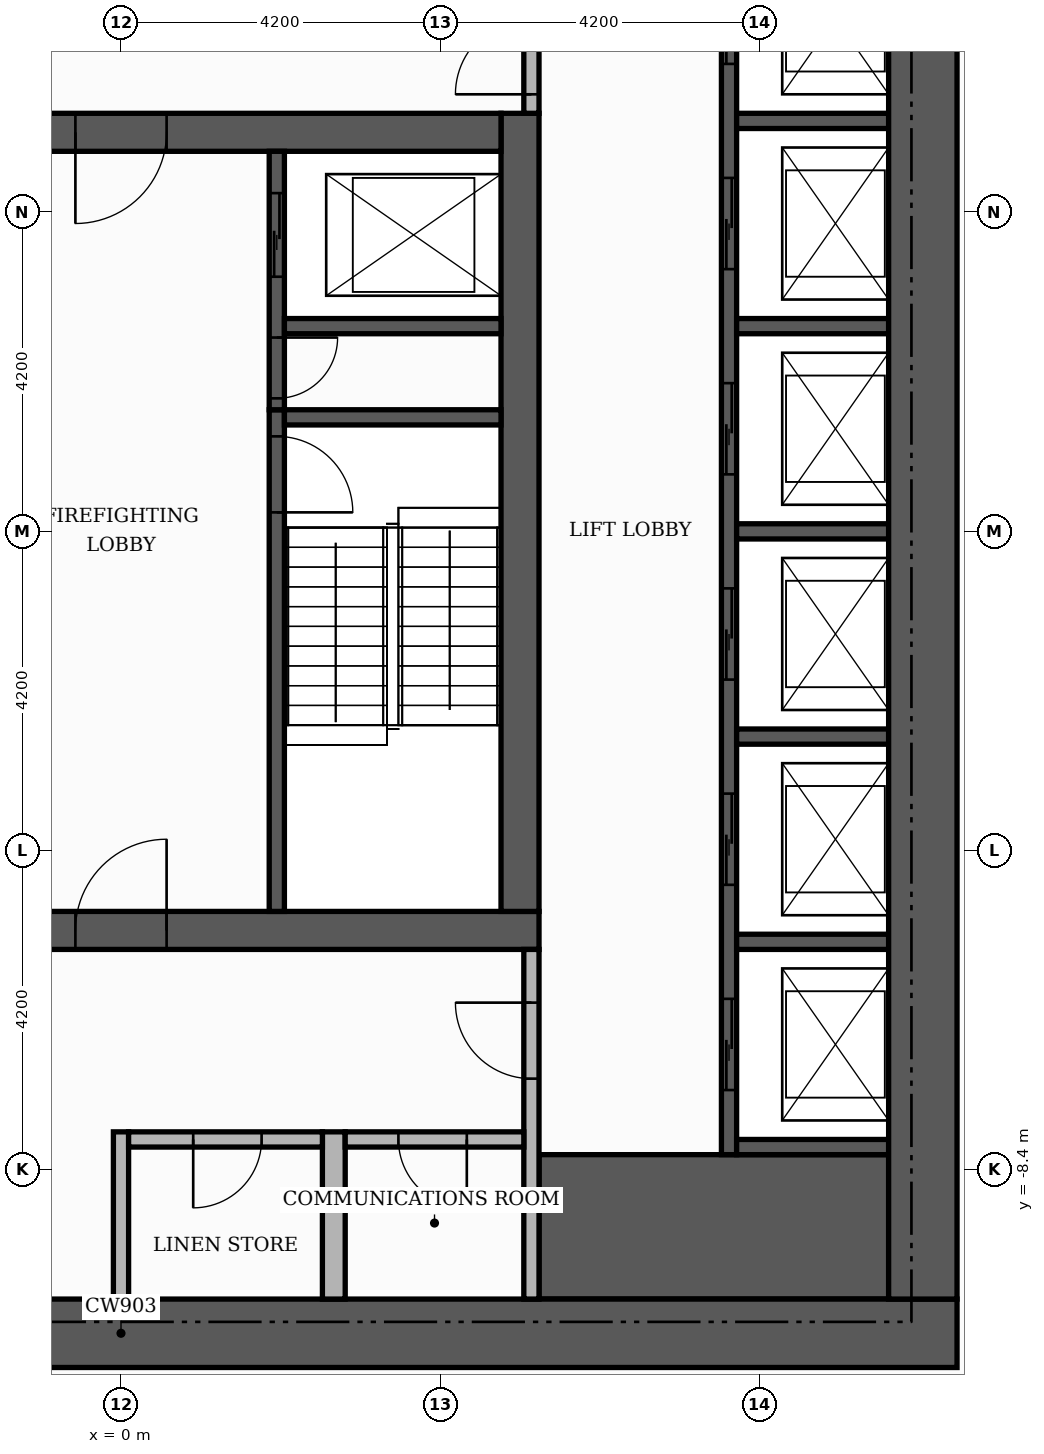
"""IFC4 building model, lengths in metres.
Left out: names, types, materials, properties, quantities, classifications, styles, units other than length and angle.
Written with IfcOpenShell. Run it as: python <this file> out.ifc"""

import sys

from ifc_helpers import new_model, si_unit, direction, frame, frame_2d, origin, place, context, subcontext, project, spatial, rectangle, extrude, element, fill, save


model = new_model("IFC4")
c1 = context("Model", 3, precision=1e-05, world=origin(), true_north=direction((0.0, 1.0)))
c2 = subcontext(c1, "Body", "Model", "MODEL_VIEW")
j1 = project(units=[si_unit("LENGTHUNIT", "METRE"), si_unit("PLANEANGLEUNIT", "RADIAN")], contexts=[c1])
p1 = place(None, origin())
s1 = spatial("IfcSite", under=j1, at=p1, CompositionType="ELEMENT")
p2 = place(p1, origin())
s2 = spatial("IfcBuilding", under=s1, at=p2, CompositionType="ELEMENT")
p3 = place(p2, frame((0.0, 0.0, 180.6)))
s3 = spatial("IfcBuildingStorey", under=s2, at=p3, CompositionType="ELEMENT", Elevation=180.6)
p4 = place(p3, frame((-5.5, -5.25, 0.0), z_axis=(0.0, 0.0, 1.0), x_axis=(1.0, 0.0, 0.0)))
e1 = element("IfcWall", 1, at=p4, inside=s3, PredefinedType="SHEAR", context=c2, shape_type="SweptSolid", body=[
    extrude(rectangle(XDim=11.0, YDim=0.5, at=frame_2d((5.5, 0.0))), origin(), (0.0, 0.0, 1.0), 7.38),
])
p5 = place(p4, frame((4.9, 0.0, 0.0)))
e2 = element("IfcOpeningElement", 2, at=p5, cuts=e1, PredefinedType="OPENING", context=c2, shape_type="SweptSolid", body=[
    extrude(rectangle(XDim=1.2, YDim=2.1, at=frame_2d((0.6, 1.05))), frame((0.0, 0.26, 0.0), z_axis=(0.0, -1.0, 0.0), x_axis=(1.0, 0.0, 0.0)), (0.0, 0.0, 1.0), 0.52),
])
p6 = place(p3, frame((5.25, -5.0, 0.0), z_axis=(0.0, 0.0, 1.0), x_axis=(0.0, 1.0, 0.0)))
e3 = element("IfcWall", 3, at=p6, inside=s3, PredefinedType="SHEAR", context=c2, shape_type="SweptSolid", body=[
    extrude(rectangle(XDim=10.5, YDim=0.5, at=frame_2d((5.25, 0.0))), origin(), (0.0, 0.0, 1.0), 7.38),
])
p7 = place(p3, frame((-5.0, 5.25, 0.0), z_axis=(0.0, 0.0, 1.0), x_axis=(1.0, 0.0, 0.0)))
e4 = element("IfcWall", 4, at=p7, inside=s3, PredefinedType="SHEAR", context=c2, shape_type="SweptSolid", body=[
    extrude(rectangle(XDim=10.0, YDim=0.5, at=frame_2d((5.0, 0.0))), origin(), (0.0, 0.0, 1.0), 7.38),
])
p8 = place(p7, frame((4.4, 0.0, 0.0)))
e5 = element("IfcOpeningElement", 5, at=p8, cuts=e4, PredefinedType="OPENING", context=c2, shape_type="SweptSolid", body=[
    extrude(rectangle(XDim=1.2, YDim=2.1, at=frame_2d((0.6, 1.05))), frame((0.0, 0.26, 0.0), z_axis=(0.0, -1.0, 0.0), x_axis=(1.0, 0.0, 0.0)), (0.0, 0.0, 1.0), 0.52),
])
p9 = place(p3, frame((5.5, -9.15, 0.0), z_axis=(0.0, 0.0, 1.0), x_axis=(1.0, 0.0, 0.0)))
e6 = element("IfcWall", 6, at=p9, inside=s3, PredefinedType="SHEAR", context=c2, shape_type="SweptSolid", body=[
    extrude(rectangle(XDim=4.6, YDim=1.9, at=frame_2d((2.3, 0.0))), origin(), (0.0, 0.0, 1.0), 7.38),
])
p10 = place(p3, frame((2.05, -5.0, 0.0), z_axis=(0.0, 0.0, 1.0), x_axis=(0.0, 1.0, 0.0)))
e7 = element("IfcWall", 7, at=p10, inside=s3, PredefinedType="SHEAR", context=c2, shape_type="SweptSolid", body=[
    extrude(rectangle(XDim=6.6, YDim=0.2, at=frame_2d((3.3, 0.0))), origin(), (0.0, 0.0, 1.0), 7.38),
])
p11 = place(p10, frame((5.25, 0.0, 0.0)))
e8 = element("IfcOpeningElement", 8, at=p11, cuts=e7, PredefinedType="OPENING", context=c2, shape_type="SweptSolid", body=[
    extrude(rectangle(XDim=1.0, YDim=2.1, at=frame_2d((0.5, 1.05))), frame((0.0, 0.11, 0.0), z_axis=(0.0, -1.0, 0.0), x_axis=(1.0, 0.0, 0.0)), (0.0, 0.0, 1.0), 0.22),
])
p12 = place(p3, frame((2.15, 1.5, 0.0), z_axis=(0.0, 0.0, 1.0), x_axis=(1.0, 0.0, 0.0)))
e9 = element("IfcWall", 9, at=p12, inside=s3, PredefinedType="SHEAR", context=c2, shape_type="SweptSolid", body=[
    extrude(rectangle(XDim=2.85, YDim=0.2, at=frame_2d((1.425, 0.0))), origin(), (0.0, 0.0, 1.0), 7.38),
])
p13 = place(p3, frame((8.0, -8.2, 0.0), z_axis=(0.0, 0.0, 1.0), x_axis=(0.0, 1.0, 0.0)))
e10 = element("IfcWall", 10, at=p13, inside=s3, PredefinedType="SHEAR", context=c2, shape_type="SweptSolid", body=[
    extrude(rectangle(XDim=16.4, YDim=0.2, at=frame_2d((8.2, 0.0))), origin(), (0.0, 0.0, 1.0), 7.38),
])
p14 = place(p13, frame((0.85, 0.0, 0.0)))
e11 = element("IfcOpeningElement", 11, at=p14, cuts=e10, PredefinedType="OPENING", context=c2, shape_type="SweptSolid", body=[
    extrude(rectangle(XDim=1.2, YDim=2.1, at=frame_2d((0.6, 1.05))), frame((0.0, 0.11, 0.0), z_axis=(0.0, -1.0, 0.0), x_axis=(1.0, 0.0, 0.0)), (0.0, 0.0, 1.0), 0.22),
])
p15 = place(p13, frame((3.55, 0.0, 0.0)))
e12 = element("IfcOpeningElement", 12, at=p15, cuts=e10, PredefinedType="OPENING", context=c2, shape_type="SweptSolid", body=[
    extrude(rectangle(XDim=1.2, YDim=2.1, at=frame_2d((0.6, 1.05))), frame((0.0, 0.11, 0.0), z_axis=(0.0, -1.0, 0.0), x_axis=(1.0, 0.0, 0.0)), (0.0, 0.0, 1.0), 0.22),
])
p16 = place(p13, frame((6.25, 0.0, 0.0)))
e13 = element("IfcOpeningElement", 13, at=p16, cuts=e10, PredefinedType="OPENING", context=c2, shape_type="SweptSolid", body=[
    extrude(rectangle(XDim=1.2, YDim=2.1, at=frame_2d((0.6, 1.05))), frame((0.0, 0.11, 0.0), z_axis=(0.0, -1.0, 0.0), x_axis=(1.0, 0.0, 0.0)), (0.0, 0.0, 1.0), 0.22),
])
p17 = place(p13, frame((8.95, 0.0, 0.0)))
e14 = element("IfcOpeningElement", 14, at=p17, cuts=e10, PredefinedType="OPENING", context=c2, shape_type="SweptSolid", body=[
    extrude(rectangle(XDim=1.2, YDim=2.1, at=frame_2d((0.6, 1.05))), frame((0.0, 0.11, 0.0), z_axis=(0.0, -1.0, 0.0), x_axis=(1.0, 0.0, 0.0)), (0.0, 0.0, 1.0), 0.22),
])
p18 = place(p13, frame((11.65, 0.0, 0.0)))
e15 = element("IfcOpeningElement", 15, at=p18, cuts=e10, PredefinedType="OPENING", context=c2, shape_type="SweptSolid", body=[
    extrude(rectangle(XDim=1.2, YDim=2.1, at=frame_2d((0.6, 1.05))), frame((0.0, 0.11, 0.0), z_axis=(0.0, -1.0, 0.0), x_axis=(1.0, 0.0, 0.0)), (0.0, 0.0, 1.0), 0.22),
])
p19 = place(p13, frame((14.35, 0.0, 0.0)))
e16 = element("IfcOpeningElement", 16, at=p19, cuts=e10, PredefinedType="OPENING", context=c2, shape_type="SweptSolid", body=[
    extrude(rectangle(XDim=1.2, YDim=2.1, at=frame_2d((0.6, 1.05))), frame((0.0, 0.11, 0.0), z_axis=(0.0, -1.0, 0.0), x_axis=(1.0, 0.0, 0.0)), (0.0, 0.0, 1.0), 0.22),
])
for number, where, z_axis, x_axis in (
    (17, (8.1, -8.1, 0.0), (0.0, 0.0, 1.0), (1.0, 0.0, 0.0)),
    (18, (8.1, -5.4, 0.0), (0.0, 0.0, 1.0), (1.0, 0.0, 0.0)),
    (19, (8.1, -2.7, 0.0), (0.0, 0.0, 1.0), (1.0, 0.0, 0.0)),
    (20, (8.1, 0.0, 0.0), (0.0, 0.0, 1.0), (1.0, 0.0, 0.0)),
):
    element("IfcWall", number, at=place(p3, frame(where, z_axis=z_axis, x_axis=x_axis)), inside=s3, PredefinedType="SHEAR", context=c2, shape_type="SweptSolid", body=[
        extrude(rectangle(XDim=2.0, YDim=0.2, at=frame_2d((1.0, 0.0))), origin(), (0.0, 0.0, 1.0), 7.38),
    ])
p20 = place(p3, frame((2.05, 1.6, 0.0), z_axis=(0.0, 0.0, 1.0), x_axis=(0.0, 1.0, 0.0)))
e21 = element("IfcWall", 21, at=p20, inside=s3, PredefinedType="SHEAR", context=c2, shape_type="SweptSolid", body=[
    extrude(rectangle(XDim=3.4, YDim=0.2, at=frame_2d((1.7, 0.0))), origin(), (0.0, 0.0, 1.0), 7.38),
])
p21 = place(p20, frame((1.75, 0.0, 0.0)))
e22 = element("IfcOpeningElement", 22, at=p21, cuts=e21, PredefinedType="OPENING", context=c2, shape_type="SweptSolid", body=[
    extrude(rectangle(XDim=1.1, YDim=2.1, at=frame_2d((0.55, 1.05))), frame((0.0, 0.11, 0.0), z_axis=(0.0, -1.0, 0.0), x_axis=(1.0, 0.0, 0.0)), (0.0, 0.0, 1.0), 0.22),
])
p22 = place(p20, frame((0.15, 0.0, 0.0)))
e23 = element("IfcOpeningElement", 23, at=p22, cuts=e21, PredefinedType="OPENING", context=c2, shape_type="SweptSolid", body=[
    extrude(rectangle(XDim=0.8, YDim=2.1, at=frame_2d((0.4, 1.05))), frame((0.0, 0.11, 0.0), z_axis=(0.0, -1.0, 0.0), x_axis=(1.0, 0.0, 0.0)), (0.0, 0.0, 1.0), 0.22),
])
p23 = place(p3, frame((2.15, 2.7, 0.0), z_axis=(0.0, 0.0, 1.0), x_axis=(1.0, 0.0, 0.0)))
e24 = element("IfcWall", 24, at=p23, inside=s3, PredefinedType="SHEAR", context=c2, shape_type="SweptSolid", body=[
    extrude(rectangle(XDim=2.85, YDim=0.2, at=frame_2d((1.425, 0.0))), origin(), (0.0, 0.0, 1.0), 7.38),
])
for number, where, z_axis, x_axis in (
    (25, (8.1, 2.7, 0.0), (0.0, 0.0, 1.0), (1.0, 0.0, 0.0)),
    (26, (8.1, 5.4, 0.0), (0.0, 0.0, 1.0), (1.0, 0.0, 0.0)),
):
    element("IfcWall", number, at=place(p3, frame(where, z_axis=z_axis, x_axis=x_axis)), inside=s3, PredefinedType="SHEAR", context=c2, shape_type="SweptSolid", body=[
        extrude(rectangle(XDim=2.0, YDim=0.2, at=frame_2d((1.0, 0.0))), origin(), (0.0, 0.0, 1.0), 7.38),
    ])
p24 = place(p3, frame((-11.0, -10.55, 0.0), z_axis=(0.0, 0.0, 1.0), x_axis=(1.0, 0.0, 0.0)))
e27 = element("IfcWall", 27, at=p24, inside=s3, PredefinedType="SHEAR", context=c2, shape_type="SweptSolid", body=[
    extrude(rectangle(XDim=22.0, YDim=0.9, at=frame_2d((11.0, 0.0))), origin(), (0.0, 0.0, 1.0), 7.38),
])
p25 = place(p24, frame((7.4, 0.0, 0.0)))
e28 = element("IfcOpeningElement", 28, at=p25, cuts=e27, PredefinedType="OPENING", context=c2, shape_type="SweptSolid", body=[
    extrude(rectangle(XDim=1.8, YDim=2.2, at=frame_2d((0.9, 1.1))), frame((0.0, 0.46, 0.0), z_axis=(0.0, -1.0, 0.0), x_axis=(1.0, 0.0, 0.0)), (0.0, 0.0, 1.0), 0.92),
])
p26 = place(p3, frame((10.55, -10.1, 0.0), z_axis=(0.0, 0.0, 1.0), x_axis=(0.0, 1.0, 0.0)))
e29 = element("IfcWall", 29, at=p26, inside=s3, PredefinedType="SHEAR", context=c2, shape_type="SweptSolid", body=[
    extrude(rectangle(XDim=20.2, YDim=0.9, at=frame_2d((10.1, 0.0))), origin(), (0.0, 0.0, 1.0), 7.38),
])
p27 = place(p3, frame((0.0, -10.1, 0.0), z_axis=(0.0, 0.0, 1.0), x_axis=(0.0, 1.0, 0.0)))
e30 = element("IfcWall", 30, at=p27, inside=s3, PredefinedType="PARTITIONING", context=c2, shape_type="SweptSolid", body=[
    extrude(rectangle(XDim=2.2, YDim=0.2, at=frame_2d((1.1, 0.0))), origin(), (0.0, 0.0, 1.0), 7.38),
])
p28 = place(p3, frame((2.8, -10.1, 0.0), z_axis=(0.0, 0.0, 1.0), x_axis=(0.0, 1.0, 0.0)))
e31 = element("IfcWall", 31, at=p28, inside=s3, PredefinedType="PARTITIONING", context=c2, shape_type="SweptSolid", body=[
    extrude(rectangle(XDim=2.2, YDim=0.3, at=frame_2d((1.1, 0.0))), origin(), (0.0, 0.0, 1.0), 7.38),
])
p29 = place(p3, frame((5.4, -10.1, 0.0), z_axis=(0.0, 0.0, 1.0), x_axis=(0.0, 1.0, 0.0)))
e32 = element("IfcWall", 32, at=p29, inside=s3, PredefinedType="PARTITIONING", context=c2, shape_type="SweptSolid", body=[
    extrude(rectangle(XDim=4.6, YDim=0.2, at=frame_2d((2.3, 0.0))), origin(), (0.0, 0.0, 1.0), 7.38),
])
p30 = place(p29, frame((2.9, 0.0, 0.0)))
e33 = element("IfcOpeningElement", 33, at=p30, cuts=e32, PredefinedType="OPENING", context=c2, shape_type="SweptSolid", body=[
    extrude(rectangle(XDim=1.0, YDim=2.1, at=frame_2d((0.5, 1.05))), frame((0.0, 0.11, 0.0), z_axis=(0.0, -1.0, 0.0), x_axis=(1.0, 0.0, 0.0)), (0.0, 0.0, 1.0), 0.22),
])
p31 = place(p3, frame((0.1, -8.0, 0.0), z_axis=(0.0, 0.0, 1.0), x_axis=(1.0, 0.0, 0.0)))
e34 = element("IfcWall", 34, at=p31, inside=s3, PredefinedType="PARTITIONING", context=c2, shape_type="SweptSolid", body=[
    extrude(rectangle(XDim=2.55, YDim=0.2, at=frame_2d((1.275, 0.0))), origin(), (0.0, 0.0, 1.0), 7.38),
])
p32 = place(p31, frame((0.85, 0.0, 0.0)))
e35 = element("IfcOpeningElement", 35, at=p32, cuts=e34, PredefinedType="OPENING", context=c2, shape_type="SweptSolid", body=[
    extrude(rectangle(XDim=0.9, YDim=2.1, at=frame_2d((0.45, 1.05))), frame((0.0, 0.11, 0.0), z_axis=(0.0, -1.0, 0.0), x_axis=(1.0, 0.0, 0.0)), (0.0, 0.0, 1.0), 0.22),
])
p33 = place(p3, frame((2.95, -8.0, 0.0), z_axis=(0.0, 0.0, 1.0), x_axis=(1.0, 0.0, 0.0)))
e36 = element("IfcWall", 36, at=p33, inside=s3, PredefinedType="PARTITIONING", context=c2, shape_type="SweptSolid", body=[
    extrude(rectangle(XDim=2.35, YDim=0.2, at=frame_2d((1.175, 0.0))), origin(), (0.0, 0.0, 1.0), 7.38),
])
p34 = place(p33, frame((0.7, 0.0, 0.0)))
e37 = element("IfcOpeningElement", 37, at=p34, cuts=e36, PredefinedType="OPENING", context=c2, shape_type="SweptSolid", body=[
    extrude(rectangle(XDim=0.9, YDim=2.1, at=frame_2d((0.45, 1.05))), frame((0.0, 0.11, 0.0), z_axis=(0.0, -1.0, 0.0), x_axis=(1.0, 0.0, 0.0)), (0.0, 0.0, 1.0), 0.22),
])
p35 = place(p3, frame((5.4, 5.5, 0.0), z_axis=(0.0, 0.0, 1.0), x_axis=(0.0, 1.0, 0.0)))
e38 = element("IfcWall", 38, at=p35, inside=s3, PredefinedType="PARTITIONING", context=c2, shape_type="SweptSolid", body=[
    extrude(rectangle(XDim=4.6, YDim=0.2, at=frame_2d((2.3, 0.0))), origin(), (0.0, 0.0, 1.0), 7.38),
])
p36 = place(p35, frame((0.25, 0.0, 0.0)))
e39 = element("IfcOpeningElement", 39, at=p36, cuts=e38, PredefinedType="OPENING", context=c2, shape_type="SweptSolid", body=[
    extrude(rectangle(XDim=1.0, YDim=2.1, at=frame_2d((0.5, 1.05))), frame((0.0, 0.11, 0.0), z_axis=(0.0, -1.0, 0.0), x_axis=(1.0, 0.0, 0.0)), (0.0, 0.0, 1.0), 0.22),
])
p37 = place(p14, origin())
e40 = element("IfcDoor", 40, at=p37, inside=s3, OperationType="SLIDING_TO_LEFT", PredefinedType="DOOR", context=c2, shape_type="SweptSolid", body=[
    extrude(rectangle(XDim=1.2, YDim=2.1, at=frame_2d((0.6, 1.05))), frame((0.0, 0.025, 0.0), z_axis=(0.0, -1.0, 0.0), x_axis=(1.0, 0.0, 0.0)), (0.0, 0.0, 1.0), 0.05),
])
fill(e11, e40)
p38 = place(p15, origin())
e41 = element("IfcDoor", 41, at=p38, inside=s3, OperationType="SLIDING_TO_LEFT", PredefinedType="DOOR", context=c2, shape_type="SweptSolid", body=[
    extrude(rectangle(XDim=1.2, YDim=2.1, at=frame_2d((0.6, 1.05))), frame((0.0, 0.025, 0.0), z_axis=(0.0, -1.0, 0.0), x_axis=(1.0, 0.0, 0.0)), (0.0, 0.0, 1.0), 0.05),
])
fill(e12, e41)
p39 = place(p16, origin())
e42 = element("IfcDoor", 42, at=p39, inside=s3, OperationType="SLIDING_TO_LEFT", PredefinedType="DOOR", context=c2, shape_type="SweptSolid", body=[
    extrude(rectangle(XDim=1.2, YDim=2.1, at=frame_2d((0.6, 1.05))), frame((0.0, 0.025, 0.0), z_axis=(0.0, -1.0, 0.0), x_axis=(1.0, 0.0, 0.0)), (0.0, 0.0, 1.0), 0.05),
])
fill(e13, e42)
p40 = place(p17, origin())
e43 = element("IfcDoor", 43, at=p40, inside=s3, OperationType="SLIDING_TO_LEFT", PredefinedType="DOOR", context=c2, shape_type="SweptSolid", body=[
    extrude(rectangle(XDim=1.2, YDim=2.1, at=frame_2d((0.6, 1.05))), frame((0.0, 0.025, 0.0), z_axis=(0.0, -1.0, 0.0), x_axis=(1.0, 0.0, 0.0)), (0.0, 0.0, 1.0), 0.05),
])
fill(e14, e43)
p41 = place(p18, origin())
e44 = element("IfcDoor", 44, at=p41, inside=s3, OperationType="SLIDING_TO_LEFT", PredefinedType="DOOR", context=c2, shape_type="SweptSolid", body=[
    extrude(rectangle(XDim=1.2, YDim=2.1, at=frame_2d((0.6, 1.05))), frame((0.0, 0.025, 0.0), z_axis=(0.0, -1.0, 0.0), x_axis=(1.0, 0.0, 0.0)), (0.0, 0.0, 1.0), 0.05),
])
fill(e15, e44)
p42 = place(p19, origin())
e45 = element("IfcDoor", 45, at=p42, inside=s3, OperationType="SLIDING_TO_LEFT", PredefinedType="DOOR", context=c2, shape_type="SweptSolid", body=[
    extrude(rectangle(XDim=1.2, YDim=2.1, at=frame_2d((0.6, 1.05))), frame((0.0, 0.025, 0.0), z_axis=(0.0, -1.0, 0.0), x_axis=(1.0, 0.0, 0.0)), (0.0, 0.0, 1.0), 0.05),
])
fill(e16, e45)
p43 = place(p21, origin())
e46 = element("IfcDoor", 46, at=p43, inside=s3, OperationType="SLIDING_TO_LEFT", PredefinedType="DOOR", context=c2, shape_type="SweptSolid", body=[
    extrude(rectangle(XDim=1.1, YDim=2.1, at=frame_2d((0.55, 1.05))), frame((0.0, 0.025, 0.0), z_axis=(0.0, -1.0, 0.0), x_axis=(1.0, 0.0, 0.0)), (0.0, 0.0, 1.0), 0.05),
])
fill(e22, e46)
p44 = place(p11, frame((1.0, 0.0, 0.0), z_axis=(0.0, 0.0, 1.0), x_axis=(-1.0, 0.0, 0.0)))
e47 = element("IfcDoor", 47, at=p44, inside=s3, OperationType="SINGLE_SWING_LEFT", PredefinedType="DOOR", context=c2, shape_type="SweptSolid", body=[
    extrude(rectangle(XDim=1.0, YDim=2.1, at=frame_2d((0.5, 1.05))), frame((0.0, 0.025, 0.0), z_axis=(0.0, -1.0, 0.0), x_axis=(1.0, 0.0, 0.0)), (0.0, 0.0, 1.0), 0.05),
])
fill(e8, e47)
p45 = place(p22, frame((0.8, 0.0, 0.0), z_axis=(0.0, 0.0, 1.0), x_axis=(-1.0, 0.0, 0.0)))
e48 = element("IfcDoor", 48, at=p45, inside=s3, OperationType="SINGLE_SWING_RIGHT", PredefinedType="DOOR", context=c2, shape_type="SweptSolid", body=[
    extrude(rectangle(XDim=0.8, YDim=2.1, at=frame_2d((0.4, 1.05))), frame((0.0, 0.025, 0.0), z_axis=(0.0, -1.0, 0.0), x_axis=(1.0, 0.0, 0.0)), (0.0, 0.0, 1.0), 0.05),
])
fill(e23, e48)
p46 = place(p8, frame((1.2, 0.0, 0.0), z_axis=(0.0, 0.0, 1.0), x_axis=(-1.0, 0.0, 0.0)))
e49 = element("IfcDoor", 49, at=p46, inside=s3, OperationType="SINGLE_SWING_LEFT", PredefinedType="DOOR", context=c2, shape_type="SweptSolid", body=[
    extrude(rectangle(XDim=1.2, YDim=2.1, at=frame_2d((0.6, 1.05))), frame((0.0, 0.025, 0.0), z_axis=(0.0, -1.0, 0.0), x_axis=(1.0, 0.0, 0.0)), (0.0, 0.0, 1.0), 0.05),
])
fill(e5, e49)
p47 = place(p5, origin())
e50 = element("IfcDoor", 50, at=p47, inside=s3, OperationType="SINGLE_SWING_RIGHT", PredefinedType="DOOR", context=c2, shape_type="SweptSolid", body=[
    extrude(rectangle(XDim=1.2, YDim=2.1, at=frame_2d((0.6, 1.05))), frame((0.0, 0.025, 0.0), z_axis=(0.0, -1.0, 0.0), x_axis=(1.0, 0.0, 0.0)), (0.0, 0.0, 1.0), 0.05),
])
fill(e2, e50)
p48 = place(p36, origin())
e51 = element("IfcDoor", 51, at=p48, inside=s3, OperationType="SINGLE_SWING_LEFT", PredefinedType="DOOR", context=c2, shape_type="SweptSolid", body=[
    extrude(rectangle(XDim=1.0, YDim=2.1, at=frame_2d((0.5, 1.05))), frame((0.0, 0.025, 0.0), z_axis=(0.0, -1.0, 0.0), x_axis=(1.0, 0.0, 0.0)), (0.0, 0.0, 1.0), 0.05),
])
fill(e39, e51)
p49 = place(p30, origin())
e52 = element("IfcDoor", 52, at=p49, inside=s3, OperationType="SINGLE_SWING_RIGHT", PredefinedType="DOOR", context=c2, shape_type="SweptSolid", body=[
    extrude(rectangle(XDim=1.0, YDim=2.1, at=frame_2d((0.5, 1.05))), frame((0.0, 0.025, 0.0), z_axis=(0.0, -1.0, 0.0), x_axis=(1.0, 0.0, 0.0)), (0.0, 0.0, 1.0), 0.05),
])
fill(e33, e52)
p50 = place(p32, frame((0.9, 0.0, 0.0), z_axis=(0.0, 0.0, 1.0), x_axis=(-1.0, 0.0, 0.0)))
e53 = element("IfcDoor", 53, at=p50, inside=s3, OperationType="SINGLE_SWING_LEFT", PredefinedType="DOOR", context=c2, shape_type="SweptSolid", body=[
    extrude(rectangle(XDim=0.9, YDim=2.1, at=frame_2d((0.45, 1.05))), frame((0.0, 0.025, 0.0), z_axis=(0.0, -1.0, 0.0), x_axis=(1.0, 0.0, 0.0)), (0.0, 0.0, 1.0), 0.05),
])
fill(e35, e53)
p51 = place(p34, frame((0.9, 0.0, 0.0), z_axis=(0.0, 0.0, 1.0), x_axis=(-1.0, 0.0, 0.0)))
e54 = element("IfcDoor", 54, at=p51, inside=s3, OperationType="SINGLE_SWING_RIGHT", PredefinedType="DOOR", context=c2, shape_type="SweptSolid", body=[
    extrude(rectangle(XDim=0.9, YDim=2.1, at=frame_2d((0.45, 1.05))), frame((0.0, 0.025, 0.0), z_axis=(0.0, -1.0, 0.0), x_axis=(1.0, 0.0, 0.0)), (0.0, 0.0, 1.0), 0.05),
])
fill(e37, e54)
save(model, sys.argv[1])
